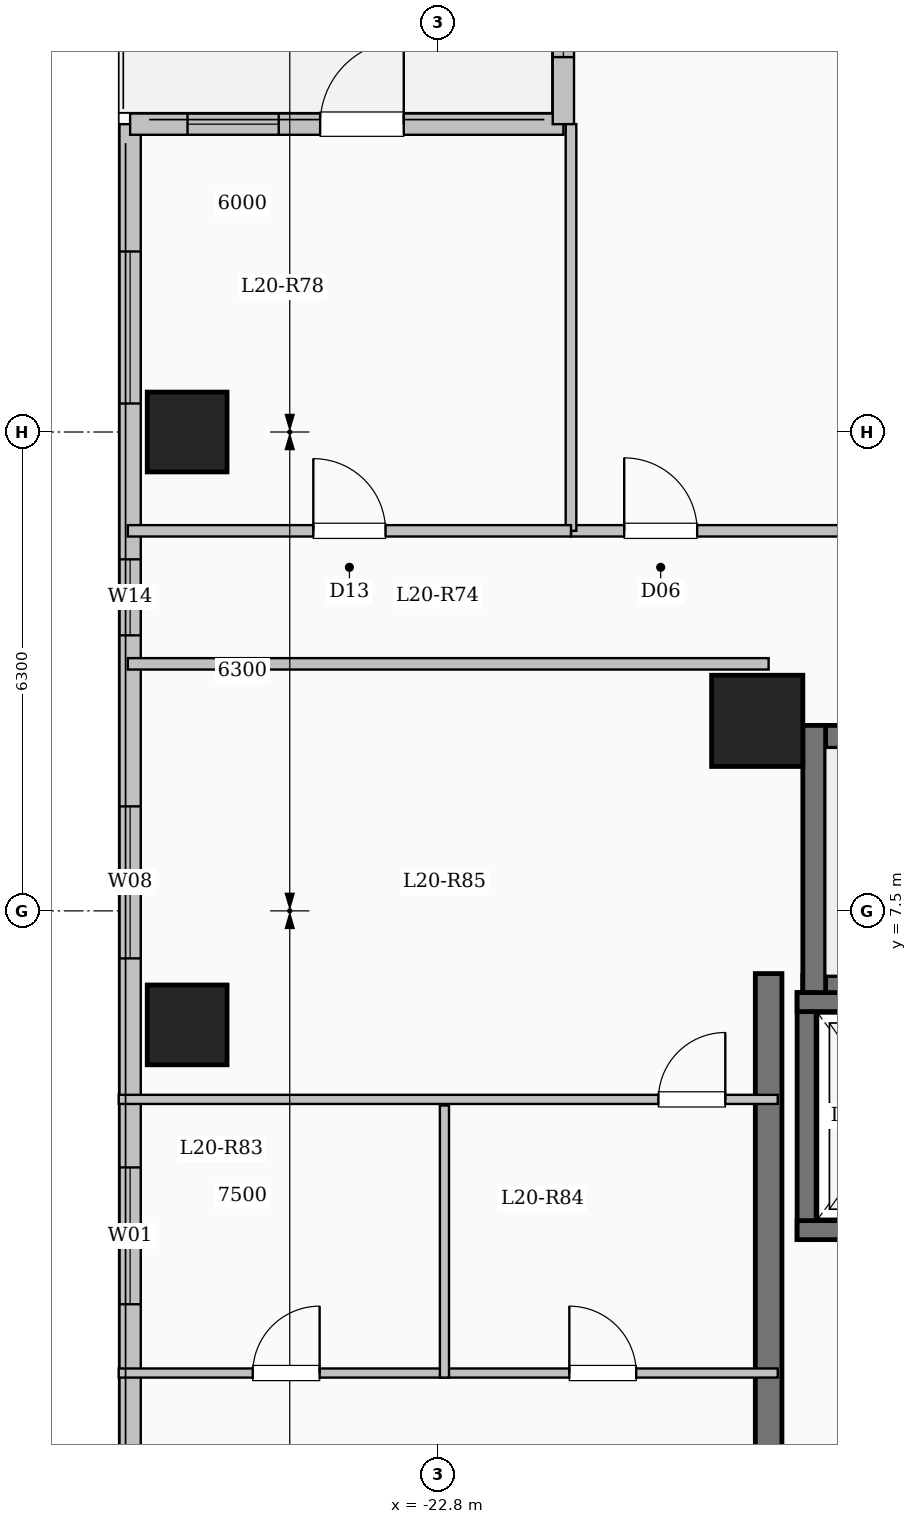
"""IFC4 building model, lengths in metres.
Left out: names, types, materials, properties, quantities, classifications, styles, units other than length and angle.
Written with IfcOpenShell. Run it as: python <this file> out.ifc"""

import sys

from ifc_helpers import new_model, si_unit, direction, frame, frame_2d, origin, origin_2d, place, context, subcontext, project, spatial, rectangle, extrude, element, fill, save


model = new_model("IFC4")
c1 = context("Model", 3, precision=1e-05, world=origin(), true_north=direction((0.0, 1.0)))
c2 = subcontext(c1, "Body", "Model", "MODEL_VIEW")
j1 = project(units=[si_unit("LENGTHUNIT", "METRE"), si_unit("PLANEANGLEUNIT", "RADIAN")], contexts=[c1])
p1 = place(None, origin())
s1 = spatial("IfcSite", under=j1, at=p1, CompositionType="ELEMENT")
p2 = place(p1, origin())
s2 = spatial("IfcBuilding", under=s1, at=p2, CompositionType="ELEMENT")
p3 = place(p2, frame((0.0, 0.0, 78.3)))
s3 = spatial("IfcBuildingStorey", under=s2, at=p3, CompositionType="ELEMENT", Elevation=78.3)
p4 = place(p3, frame((-18.6, 10.0, 0.0), z_axis=(0.0, 0.0, 1.0), x_axis=(1.0, 0.0, 0.0)))
e1 = element("IfcColumn", 1, at=p4, inside=s3, PredefinedType="COLUMN", context=c2, shape_type="SweptSolid", body=[
    extrude(rectangle(XDim=1.2, YDim=1.2, at=origin_2d()), origin(), (0.0, 0.0, 1.0), 3.35),
])
for number, where, z_axis, x_axis in (
    (2, (-26.1, 6.0, 0.0), (0.0, 0.0, 1.0), (1.0, 0.0, 0.0)),
    (3, (-26.1, 13.8, 0.0), (0.0, 0.0, 1.0), (1.0, 0.0, 0.0)),
):
    element("IfcColumn", number, at=place(p3, frame(where, z_axis=z_axis, x_axis=x_axis)), inside=s3, PredefinedType="COLUMN", context=c2, shape_type="SweptSolid", body=[
        extrude(rectangle(XDim=1.05, YDim=1.05, at=origin_2d()), origin(), (0.0, 0.0, 1.0), 3.35),
    ])
p5 = place(p3, frame((-26.85, -17.85, 0.0), z_axis=(0.0, 0.0, 1.0), x_axis=(0.0, 1.0, 0.0)))
e4 = element("IfcWall", 4, at=p5, inside=s3, PredefinedType="SOLIDWALL", context=c2, shape_type="SweptSolid", body=[
    extrude(rectangle(XDim=35.7, YDim=0.28, at=frame_2d((17.85, 0.0))), origin(), (0.0, 0.0, 1.0), 3.1),
])
p6 = place(p5, frame((2.55, 0.0, 0.9)))
e5 = element("IfcOpeningElement", 5, at=p6, cuts=e4, PredefinedType="OPENING", context=c2, shape_type="SweptSolid", body=[
    extrude(rectangle(XDim=2.4, YDim=1.8, at=frame_2d((1.2, 0.9))), frame((0.0, 0.15, 0.0), z_axis=(0.0, -1.0, 0.0), x_axis=(1.0, 0.0, 0.0)), (0.0, 0.0, 1.0), 0.3),
])
p7 = place(p5, frame((8.343, 0.0, 0.9)))
e6 = element("IfcOpeningElement", 6, at=p7, cuts=e4, PredefinedType="OPENING", context=c2, shape_type="SweptSolid", body=[
    extrude(rectangle(XDim=1.5, YDim=1.65, at=frame_2d((0.75, 0.825))), frame((0.0, 0.15, 0.0), z_axis=(0.0, -1.0, 0.0), x_axis=(1.0, 0.0, 0.0)), (0.0, 0.0, 1.0), 0.3),
])
p8 = place(p5, frame((13.75, 0.0, 0.9)))
e7 = element("IfcOpeningElement", 7, at=p8, cuts=e4, PredefinedType="OPENING", context=c2, shape_type="SweptSolid", body=[
    extrude(rectangle(XDim=2.4, YDim=1.8, at=frame_2d((1.2, 0.9))), frame((0.0, 0.15, 0.0), z_axis=(0.0, -1.0, 0.0), x_axis=(1.0, 0.0, 0.0)), (0.0, 0.0, 1.0), 0.3),
])
p9 = place(p5, frame((20.175, 0.0, 0.9)))
e8 = element("IfcOpeningElement", 8, at=p9, cuts=e4, PredefinedType="OPENING", context=c2, shape_type="SweptSolid", body=[
    extrude(rectangle(XDim=1.8, YDim=1.65, at=frame_2d((0.9, 0.825))), frame((0.0, 0.15, 0.0), z_axis=(0.0, -1.0, 0.0), x_axis=(1.0, 0.0, 0.0)), (0.0, 0.0, 1.0), 0.3),
])
p10 = place(p5, frame((24.725, 0.0, 0.9)))
e9 = element("IfcOpeningElement", 9, at=p10, cuts=e4, PredefinedType="OPENING", context=c2, shape_type="SweptSolid", body=[
    extrude(rectangle(XDim=2.0, YDim=1.7, at=frame_2d((1.0, 0.85))), frame((0.0, 0.15, 0.0), z_axis=(0.0, -1.0, 0.0), x_axis=(1.0, 0.0, 0.0)), (0.0, 0.0, 1.0), 0.3),
])
p11 = place(p5, frame((28.975, 0.0, 0.95)))
e10 = element("IfcOpeningElement", 10, at=p11, cuts=e4, PredefinedType="OPENING", context=c2, shape_type="SweptSolid", body=[
    extrude(rectangle(XDim=1.0, YDim=1.5, at=frame_2d((0.5, 0.75))), frame((0.0, 0.15, 0.0), z_axis=(0.0, -1.0, 0.0), x_axis=(1.0, 0.0, 0.0)), (0.0, 0.0, 1.0), 0.3),
])
p12 = place(p5, frame((32.025, 0.0, 0.9)))
e11 = element("IfcOpeningElement", 11, at=p12, cuts=e4, PredefinedType="OPENING", context=c2, shape_type="SweptSolid", body=[
    extrude(rectangle(XDim=2.0, YDim=1.7, at=frame_2d((1.0, 0.85))), frame((0.0, 0.15, 0.0), z_axis=(0.0, -1.0, 0.0), x_axis=(1.0, 0.0, 0.0)), (0.0, 0.0, 1.0), 0.3),
])
p13 = place(p3, frame((-26.85, 17.85, 0.0), z_axis=(0.0, 0.0, 1.0), x_axis=(1.0, 0.0, 0.0)))
e12 = element("IfcWall", 12, at=p13, inside=s3, PredefinedType="SOLIDWALL", context=c2, shape_type="SweptSolid", body=[
    extrude(rectangle(XDim=5.7, YDim=0.28, at=frame_2d((2.85, 0.0))), origin(), (0.0, 0.0, 1.0), 3.1),
])
p14 = place(p13, frame((2.5, 0.0, 0.0)))
e13 = element("IfcOpeningElement", 13, at=p14, cuts=e12, PredefinedType="OPENING", context=c2, shape_type="SweptSolid", body=[
    extrude(rectangle(XDim=1.1, YDim=2.2, at=frame_2d((0.55, 1.1))), frame((0.0, 0.15, 0.0), z_axis=(0.0, -1.0, 0.0), x_axis=(1.0, 0.0, 0.0)), (0.0, 0.0, 1.0), 0.3),
])
p15 = place(p13, frame((0.755, 0.0, 0.95)))
e14 = element("IfcOpeningElement", 14, at=p15, cuts=e12, PredefinedType="OPENING", context=c2, shape_type="SweptSolid", body=[
    extrude(rectangle(XDim=1.2, YDim=1.5, at=frame_2d((0.6, 0.75))), frame((0.0, 0.15, 0.0), z_axis=(0.0, -1.0, 0.0), x_axis=(1.0, 0.0, 0.0)), (0.0, 0.0, 1.0), 0.3),
])
p16 = place(p3, frame((-21.15, 17.85, 0.0), z_axis=(0.0, 0.0, 1.0), x_axis=(0.0, 1.0, 0.0)))
e15 = element("IfcWall", 15, at=p16, inside=s3, PredefinedType="SOLIDWALL", context=c2, shape_type="SweptSolid", body=[
    extrude(rectangle(XDim=4.2, YDim=0.28, at=frame_2d((2.1, 0.0))), origin(), (0.0, 0.0, 1.0), 3.1),
])
p17 = place(p16, frame((0.882, 0.0, 0.9)))
e16 = element("IfcOpeningElement", 16, at=p17, cuts=e15, PredefinedType="OPENING", context=c2, shape_type="SweptSolid", body=[
    extrude(rectangle(XDim=2.4, YDim=1.8, at=frame_2d((1.2, 0.9))), frame((0.0, 0.15, 0.0), z_axis=(0.0, -1.0, 0.0), x_axis=(1.0, 0.0, 0.0)), (0.0, 0.0, 1.0), 0.3),
])
p18 = place(p3, frame((-18.0, 9.79, 0.0), z_axis=(0.0, 0.0, 1.0), x_axis=(1.0, 0.0, 0.0)))
e17 = element("IfcWall", 17, at=p18, inside=s3, PredefinedType="SHEAR", context=c2, shape_type="SweptSolid", body=[
    extrude(rectangle(XDim=8.0, YDim=0.3, at=frame_2d((4.0, 0.0))), origin(), (0.0, 0.0, 1.0), 3.35),
])
p19 = place(p3, frame((-18.0, 6.5, 0.0), z_axis=(0.0, 0.0, 1.0), x_axis=(1.0, 0.0, 0.0)))
e18 = element("IfcWall", 18, at=p19, inside=s3, PredefinedType="SHEAR", context=c2, shape_type="SweptSolid", body=[
    extrude(rectangle(XDim=8.0, YDim=0.3, at=frame_2d((4.0, 0.0))), origin(), (0.0, 0.0, 1.0), 3.35),
])
p20 = place(p19, frame((6.45, 0.0, 0.0)))
e19 = element("IfcOpeningElement", 19, at=p20, cuts=e18, PredefinedType="OPENING", context=c2, shape_type="SweptSolid", body=[
    extrude(rectangle(XDim=1.0, YDim=2.15, at=frame_2d((0.5, 1.075))), frame((0.0, 0.16, 0.0), z_axis=(0.0, -1.0, 0.0), x_axis=(1.0, 0.0, 0.0)), (0.0, 0.0, 1.0), 0.32),
])
p21 = place(p3, frame((-17.85, 6.35, 0.0), z_axis=(0.0, 0.0, 1.0), x_axis=(0.0, 1.0, 0.0)))
e20 = element("IfcWall", 20, at=p21, inside=s3, PredefinedType="SHEAR", context=c2, shape_type="SweptSolid", body=[
    extrude(rectangle(XDim=3.59, YDim=0.3, at=frame_2d((1.795, 0.0))), origin(), (0.0, 0.0, 1.0), 3.35),
])
p22 = place(p3, frame((-17.95, 3.175, 0.0), z_axis=(0.0, 0.0, 1.0), x_axis=(0.0, 1.0, 0.0)))
e21 = element("IfcWall", 21, at=p22, inside=s3, PredefinedType="SHEAR", context=c2, shape_type="SweptSolid", body=[
    extrude(rectangle(XDim=3.25, YDim=0.25, at=frame_2d((1.625, 0.0))), origin(), (0.0, 0.0, 1.0), 3.35),
])
for number, where, z_axis, x_axis in (
    (22, (-18.075, 3.3, 0.0), (0.0, 0.0, 1.0), (1.0, 0.0, 0.0)),
    (23, (-18.075, 6.3, 0.0), (0.0, 0.0, 1.0), (1.0, 0.0, 0.0)),
):
    element("IfcWall", number, at=place(p3, frame(where, z_axis=z_axis, x_axis=x_axis)), inside=s3, PredefinedType="SHEAR", context=c2, shape_type="SweptSolid", body=[
        extrude(rectangle(XDim=2.55, YDim=0.25, at=frame_2d((1.275, 0.0))), origin(), (0.0, 0.0, 1.0), 3.35),
    ])
p23 = place(p3, frame((-18.45, -7.375, 0.0), z_axis=(0.0, 0.0, 1.0), x_axis=(0.0, 1.0, 0.0)))
e24 = element("IfcWall", 24, at=p23, inside=s3, PredefinedType="SHEAR", context=c2, shape_type="SweptSolid", body=[
    extrude(rectangle(XDim=14.05, YDim=0.35, at=frame_2d((7.025, 0.0))), origin(), (0.0, 0.0, 1.0), 3.35),
])
p24 = place(p3, frame((-21.05, 12.5, 0.0), z_axis=(0.0, 0.0, 1.0), x_axis=(1.0, 0.0, 0.0)))
e25 = element("IfcWall", 25, at=p24, inside=s3, PredefinedType="PARTITIONING", context=c2, shape_type="SweptSolid", body=[
    extrude(rectangle(XDim=17.2, YDim=0.15, at=frame_2d((8.6, 0.0))), origin(), (0.0, 0.0, 1.0), 3.1),
])
p25 = place(p24, frame((0.7, 0.0, 0.0)))
e26 = element("IfcOpeningElement", 26, at=p25, cuts=e25, PredefinedType="OPENING", context=c2, shape_type="SweptSolid", body=[
    extrude(rectangle(XDim=0.96, YDim=2.15, at=frame_2d((0.48, 1.075))), frame((0.0, 0.085, 0.0), z_axis=(0.0, -1.0, 0.0), x_axis=(1.0, 0.0, 0.0)), (0.0, 0.0, 1.0), 0.17),
])
p26 = place(p24, frame((11.068, 0.0, 0.0)))
e27 = element("IfcOpeningElement", 27, at=p26, cuts=e25, PredefinedType="OPENING", context=c2, shape_type="SweptSolid", body=[
    extrude(rectangle(XDim=0.96, YDim=2.15, at=frame_2d((0.48, 1.075))), frame((0.0, 0.085, 0.0), z_axis=(0.0, -1.0, 0.0), x_axis=(1.0, 0.0, 0.0)), (0.0, 0.0, 1.0), 0.17),
])
p27 = place(p3, frame((-26.88, 10.75, 0.0), z_axis=(0.0, 0.0, 1.0), x_axis=(1.0, 0.0, 0.0)))
e28 = element("IfcWall", 28, at=p27, inside=s3, PredefinedType="PARTITIONING", context=c2, shape_type="SweptSolid", body=[
    extrude(rectangle(XDim=8.43, YDim=0.15, at=frame_2d((4.215, 0.0))), origin(), (0.0, 0.0, 1.0), 3.1),
])
p28 = place(p3, frame((-21.05, 12.5, 0.0), z_axis=(0.0, 0.0, 1.0), x_axis=(0.0, 1.0, 0.0)))
e29 = element("IfcWall", 29, at=p28, inside=s3, PredefinedType="PARTITIONING", context=c2, shape_type="SweptSolid", body=[
    extrude(rectangle(XDim=5.35, YDim=0.14, at=frame_2d((2.675, 0.0))), origin(), (0.0, 0.0, 1.0), 3.1),
])
p29 = place(p3, frame((-26.88, 12.5, 0.0), z_axis=(0.0, 0.0, 1.0), x_axis=(1.0, 0.0, 0.0)))
e30 = element("IfcWall", 30, at=p29, inside=s3, PredefinedType="PARTITIONING", context=c2, shape_type="SweptSolid", body=[
    extrude(rectangle(XDim=5.83, YDim=0.15, at=frame_2d((2.915, 0.0))), origin(), (0.0, 0.0, 1.0), 3.1),
])
p30 = place(p29, frame((2.44, 0.0, 0.0)))
e31 = element("IfcOpeningElement", 31, at=p30, cuts=e30, PredefinedType="OPENING", context=c2, shape_type="SweptSolid", body=[
    extrude(rectangle(XDim=0.95, YDim=2.15, at=frame_2d((0.475, 1.075))), frame((0.0, 0.085, 0.0), z_axis=(0.0, -1.0, 0.0), x_axis=(1.0, 0.0, 0.0)), (0.0, 0.0, 1.0), 0.17),
])
p31 = place(p3, frame((-27.0, 1.42, 0.0), z_axis=(0.0, 0.0, 1.0), x_axis=(1.0, 0.0, 0.0)))
e32 = element("IfcWall", 32, at=p31, inside=s3, PredefinedType="PARTITIONING", context=c2, shape_type="SweptSolid", body=[
    extrude(rectangle(XDim=8.67, YDim=0.12, at=frame_2d((4.335, 0.0))), origin(), (0.0, 0.0, 1.0), 3.1),
])
p32 = place(p31, frame((1.763, 0.0, 0.0)))
e33 = element("IfcOpeningElement", 33, at=p32, cuts=e32, PredefinedType="OPENING", context=c2, shape_type="SweptSolid", body=[
    extrude(rectangle(XDim=0.88, YDim=2.1, at=frame_2d((0.44, 1.05))), frame((0.0, 0.07, 0.0), z_axis=(0.0, -1.0, 0.0), x_axis=(1.0, 0.0, 0.0)), (0.0, 0.0, 1.0), 0.14),
])
p33 = place(p31, frame((5.928, 0.0, 0.0)))
e34 = element("IfcOpeningElement", 34, at=p33, cuts=e32, PredefinedType="OPENING", context=c2, shape_type="SweptSolid", body=[
    extrude(rectangle(XDim=0.88, YDim=2.1, at=frame_2d((0.44, 1.05))), frame((0.0, 0.07, 0.0), z_axis=(0.0, -1.0, 0.0), x_axis=(1.0, 0.0, 0.0)), (0.0, 0.0, 1.0), 0.14),
])
p34 = place(p3, frame((-27.0, 5.02, 0.0), z_axis=(0.0, 0.0, 1.0), x_axis=(1.0, 0.0, 0.0)))
e35 = element("IfcWall", 35, at=p34, inside=s3, PredefinedType="PARTITIONING", context=c2, shape_type="SweptSolid", body=[
    extrude(rectangle(XDim=8.67, YDim=0.12, at=frame_2d((4.335, 0.0))), origin(), (0.0, 0.0, 1.0), 3.1),
])
p35 = place(p34, frame((7.1, 0.0, 0.0)))
e36 = element("IfcOpeningElement", 36, at=p35, cuts=e35, PredefinedType="OPENING", context=c2, shape_type="SweptSolid", body=[
    extrude(rectangle(XDim=0.88, YDim=2.1, at=frame_2d((0.44, 1.05))), frame((0.0, 0.07, 0.0), z_axis=(0.0, -1.0, 0.0), x_axis=(1.0, 0.0, 0.0)), (0.0, 0.0, 1.0), 0.14),
])
p36 = place(p3, frame((-22.715, 1.36, 0.0), z_axis=(0.0, 0.0, 1.0), x_axis=(0.0, 1.0, 0.0)))
e37 = element("IfcWall", 37, at=p36, inside=s3, PredefinedType="PARTITIONING", context=c2, shape_type="SweptSolid", body=[
    extrude(rectangle(XDim=3.58, YDim=0.12, at=frame_2d((1.79, 0.0))), origin(), (0.0, 0.0, 1.0), 3.1),
])
p37 = place(p9, origin())
e38 = element("IfcWindow", 38, at=p37, inside=s3, PartitioningType="SINGLE_PANEL", PredefinedType="WINDOW", context=c2, shape_type="SweptSolid", body=[
    extrude(rectangle(XDim=1.8, YDim=1.65, at=frame_2d((0.9, 0.825))), frame((0.0, 0.03, 0.0), z_axis=(0.0, -1.0, 0.0), x_axis=(1.0, 0.0, 0.0)), (0.0, 0.0, 1.0), 0.06),
])
fill(e8, e38)
p38 = place(p10, origin())
e39 = element("IfcWindow", 39, at=p38, inside=s3, PartitioningType="SINGLE_PANEL", PredefinedType="WINDOW", context=c2, shape_type="SweptSolid", body=[
    extrude(rectangle(XDim=2.0, YDim=1.7, at=frame_2d((1.0, 0.85))), frame((0.0, 0.03, 0.0), z_axis=(0.0, -1.0, 0.0), x_axis=(1.0, 0.0, 0.0)), (0.0, 0.0, 1.0), 0.06),
])
fill(e9, e39)
p39 = place(p11, origin())
e40 = element("IfcWindow", 40, at=p39, inside=s3, PartitioningType="SINGLE_PANEL", PredefinedType="WINDOW", context=c2, shape_type="SweptSolid", body=[
    extrude(rectangle(XDim=1.0, YDim=1.5, at=frame_2d((0.5, 0.75))), frame((0.0, 0.03, 0.0), z_axis=(0.0, -1.0, 0.0), x_axis=(1.0, 0.0, 0.0)), (0.0, 0.0, 1.0), 0.06),
])
fill(e10, e40)
p40 = place(p12, origin())
e41 = element("IfcWindow", 41, at=p40, inside=s3, PartitioningType="SINGLE_PANEL", PredefinedType="WINDOW", context=c2, shape_type="SweptSolid", body=[
    extrude(rectangle(XDim=2.0, YDim=1.7, at=frame_2d((1.0, 0.85))), frame((0.0, 0.03, 0.0), z_axis=(0.0, -1.0, 0.0), x_axis=(1.0, 0.0, 0.0)), (0.0, 0.0, 1.0), 0.06),
])
fill(e11, e41)
p41 = place(p14, origin())
e42 = element("IfcDoor", 42, at=p41, inside=s3, OperationType="SINGLE_SWING_RIGHT", PredefinedType="DOOR", context=c2, shape_type="SweptSolid", body=[
    extrude(rectangle(XDim=1.1, YDim=2.2, at=frame_2d((0.55, 1.1))), frame((0.0, 0.025, 0.0), z_axis=(0.0, -1.0, 0.0), x_axis=(1.0, 0.0, 0.0)), (0.0, 0.0, 1.0), 0.05),
])
fill(e13, e42)
p42 = place(p15, origin())
e43 = element("IfcWindow", 43, at=p42, inside=s3, PartitioningType="SINGLE_PANEL", PredefinedType="WINDOW", context=c2, shape_type="SweptSolid", body=[
    extrude(rectangle(XDim=1.2, YDim=1.5, at=frame_2d((0.6, 0.75))), frame((0.0, 0.03, 0.0), z_axis=(0.0, -1.0, 0.0), x_axis=(1.0, 0.0, 0.0)), (0.0, 0.0, 1.0), 0.06),
])
fill(e14, e43)
p43 = place(p17, origin())
e44 = element("IfcWindow", 44, at=p43, inside=s3, PartitioningType="SINGLE_PANEL", PredefinedType="WINDOW", context=c2, shape_type="SweptSolid", body=[
    extrude(rectangle(XDim=2.4, YDim=1.8, at=frame_2d((1.2, 0.9))), frame((0.0, 0.03, 0.0), z_axis=(0.0, -1.0, 0.0), x_axis=(1.0, 0.0, 0.0)), (0.0, 0.0, 1.0), 0.06),
])
fill(e16, e44)
p44 = place(p25, origin())
e45 = element("IfcDoor", 45, at=p44, inside=s3, OperationType="SINGLE_SWING_LEFT", PredefinedType="DOOR", context=c2, shape_type="SweptSolid", body=[
    extrude(rectangle(XDim=0.96, YDim=2.15, at=frame_2d((0.48, 1.075))), frame((0.0, 0.025, 0.0), z_axis=(0.0, -1.0, 0.0), x_axis=(1.0, 0.0, 0.0)), (0.0, 0.0, 1.0), 0.05),
])
fill(e26, e45)
p45 = place(p30, origin())
e46 = element("IfcDoor", 46, at=p45, inside=s3, OperationType="SINGLE_SWING_LEFT", PredefinedType="DOOR", context=c2, shape_type="SweptSolid", body=[
    extrude(rectangle(XDim=0.95, YDim=2.15, at=frame_2d((0.475, 1.075))), frame((0.0, 0.025, 0.0), z_axis=(0.0, -1.0, 0.0), x_axis=(1.0, 0.0, 0.0)), (0.0, 0.0, 1.0), 0.05),
])
fill(e31, e46)
p46 = place(p32, origin())
e47 = element("IfcDoor", 47, at=p46, inside=s3, OperationType="SINGLE_SWING_RIGHT", PredefinedType="DOOR", context=c2, shape_type="SweptSolid", body=[
    extrude(rectangle(XDim=0.88, YDim=2.1, at=frame_2d((0.44, 1.05))), frame((0.0, 0.025, 0.0), z_axis=(0.0, -1.0, 0.0), x_axis=(1.0, 0.0, 0.0)), (0.0, 0.0, 1.0), 0.05),
])
fill(e33, e47)
p47 = place(p33, origin())
e48 = element("IfcDoor", 48, at=p47, inside=s3, OperationType="SINGLE_SWING_LEFT", PredefinedType="DOOR", context=c2, shape_type="SweptSolid", body=[
    extrude(rectangle(XDim=0.88, YDim=2.1, at=frame_2d((0.44, 1.05))), frame((0.0, 0.025, 0.0), z_axis=(0.0, -1.0, 0.0), x_axis=(1.0, 0.0, 0.0)), (0.0, 0.0, 1.0), 0.05),
])
fill(e34, e48)
p48 = place(p35, origin())
e49 = element("IfcDoor", 49, at=p48, inside=s3, OperationType="SINGLE_SWING_RIGHT", PredefinedType="DOOR", context=c2, shape_type="SweptSolid", body=[
    extrude(rectangle(XDim=0.88, YDim=2.1, at=frame_2d((0.44, 1.05))), frame((0.0, 0.025, 0.0), z_axis=(0.0, -1.0, 0.0), x_axis=(1.0, 0.0, 0.0)), (0.0, 0.0, 1.0), 0.05),
])
fill(e36, e49)
save(model, sys.argv[1])
